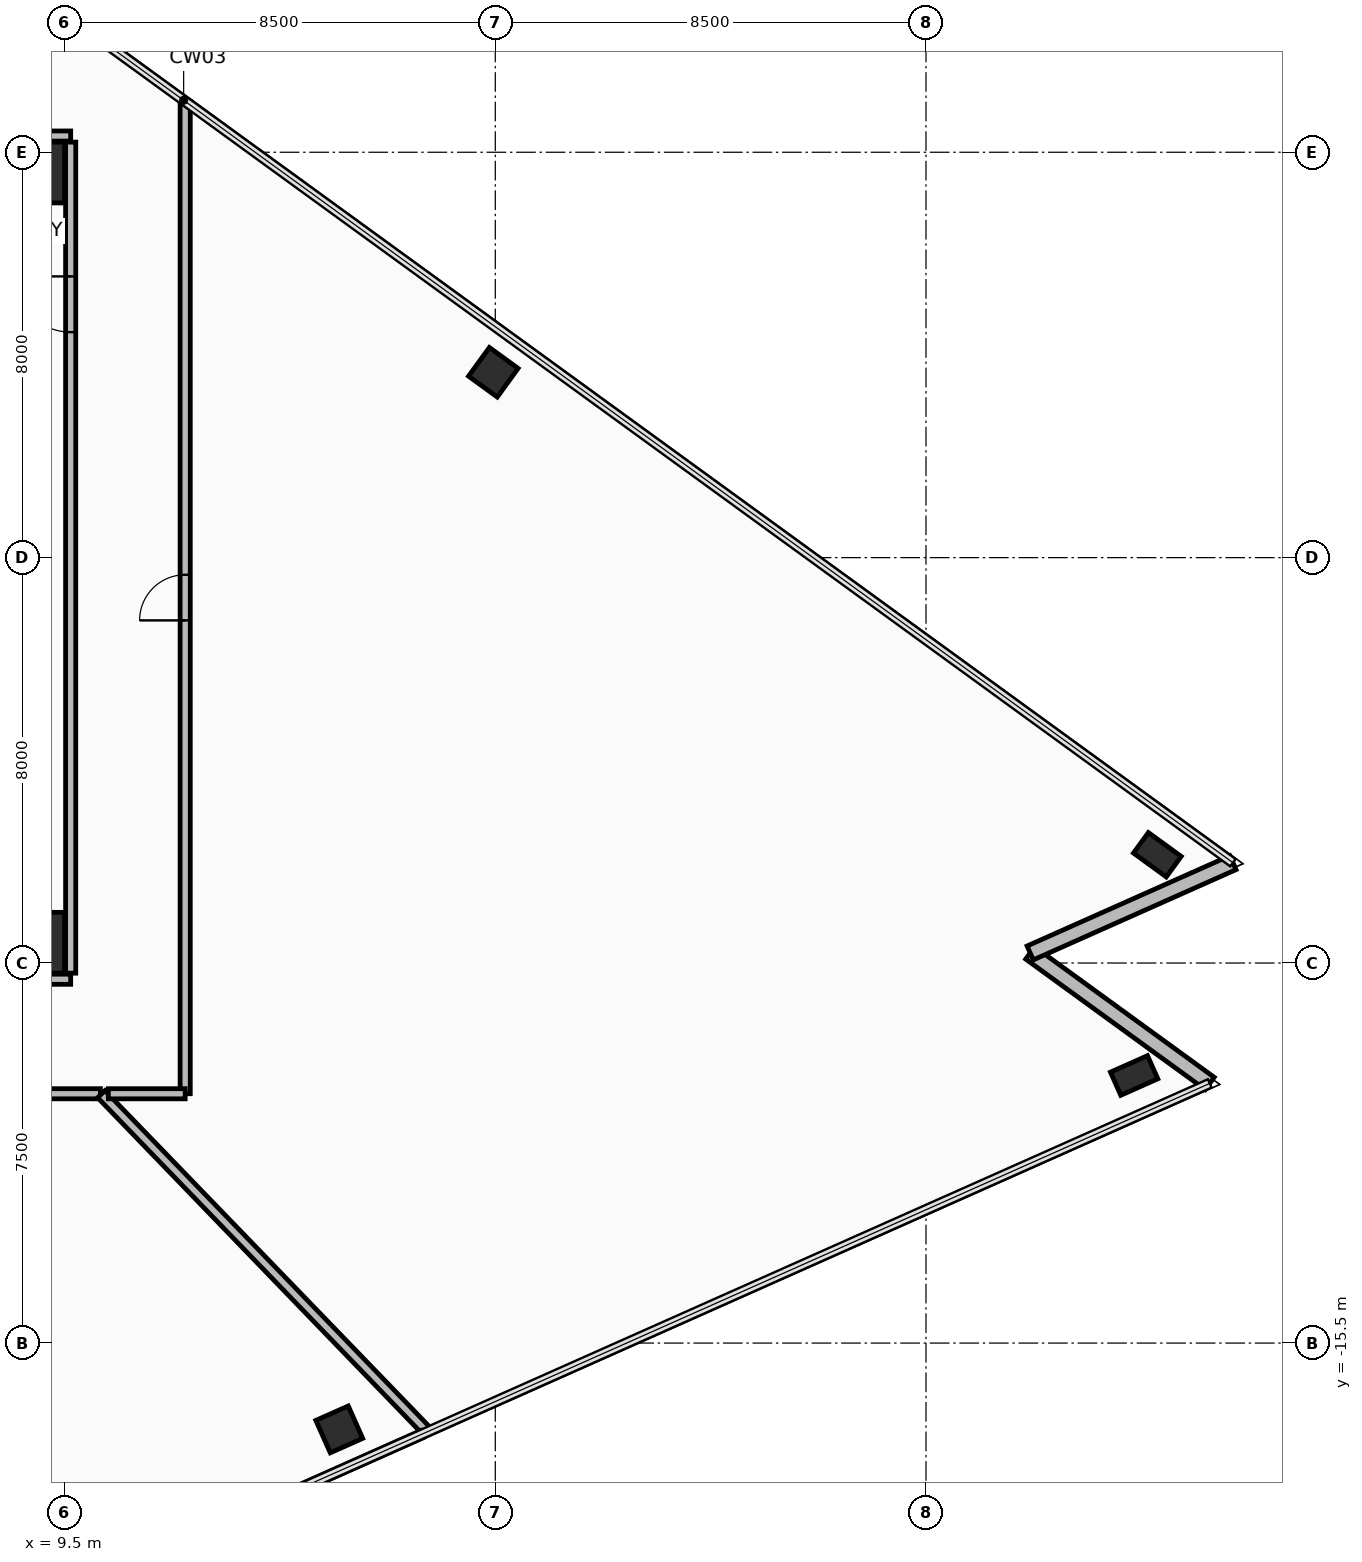
"""IFC4 building model, lengths in metres.
Left out: names, types, materials, properties, quantities, classifications, styles, units other than length and angle.
Written with IfcOpenShell. Run it as: python <this file> out.ifc"""

import sys

from ifc_helpers import new_model, si_unit, direction, frame, frame_2d, origin, origin_2d, place, context, subcontext, project, spatial, rectangle, hollow_rectangle, extrude, element, fill, save


model = new_model("IFC4")
c1 = context("Model", 3, precision=1e-05, world=origin(), true_north=direction((0.0, 1.0)))
c2 = subcontext(c1, "Body", "Model", "MODEL_VIEW")
j1 = project(units=[si_unit("LENGTHUNIT", "METRE"), si_unit("PLANEANGLEUNIT", "RADIAN")], contexts=[c1])
p1 = place(None, origin())
s1 = spatial("IfcSite", under=j1, at=p1, CompositionType="ELEMENT")
p2 = place(p1, origin())
s2 = spatial("IfcBuilding", under=s1, at=p2, CompositionType="ELEMENT")
p3 = place(p2, frame((0.0, 0.0, 123.25)))
s3 = spatial("IfcBuildingStorey", under=s2, at=p3, CompositionType="ELEMENT", Elevation=123.25)
for number, where, z_axis, x_axis in (
    (1, (8.9, -7.6, 0.0), (0.0, 0.0, 1.0), (1.0, 0.0, 0.0)),
    (2, (8.9, 7.6, 0.0), (0.0, 0.0, 1.0), (1.0, 0.0, 0.0)),
):
    element("IfcColumn", number, at=place(p3, frame(where, z_axis=z_axis, x_axis=x_axis)), inside=s3, PredefinedType="COLUMN", context=c2, shape_type="SweptSolid", body=[
        extrude(rectangle(XDim=1.2, YDim=1.2, at=origin_2d()), origin(), (0.0, 0.0, 1.0), 3.6),
    ])
p4 = place(p3, frame((14.921, -17.204, 0.0), z_axis=(0.0, 0.0, 1.0), x_axis=(0.913545457643, 0.406736643076, 0.0)))
e3 = element("IfcColumn", 3, at=p4, inside=s3, PredefinedType="COLUMN", context=c2, shape_type="SweptSolid", body=[
    extrude(hollow_rectangle(XDim=0.7, YDim=0.7, WallThickness=0.04, at=origin_2d()), origin(), (0.0, 0.0, 1.0), 3.6),
])
for number, where, z_axis, x_axis in (
    (4, (30.608, -10.219, 0.0), (0.0, 0.0, 1.0), (0.914, 0.407, 0.0)),
    (5, (31.066, -5.863, 0.0), (0.0, 0.0, 1.0), (-0.809, 0.588, 0.0)),
):
    element("IfcColumn", number, at=place(p3, frame(where, z_axis=z_axis, x_axis=x_axis)), inside=s3, PredefinedType="COLUMN", context=c2, shape_type="SweptSolid", body=[
        extrude(hollow_rectangle(XDim=0.5, YDim=0.8, WallThickness=0.04, at=origin_2d()), origin(), (0.0, 0.0, 1.0), 3.6),
    ])
p5 = place(p3, frame((17.961, 3.658, 0.0), z_axis=(0.0, 0.0, 1.0), x_axis=(-0.809016994375, 0.587785252292, 0.0)))
e6 = element("IfcColumn", 6, at=p5, inside=s3, PredefinedType="COLUMN", context=c2, shape_type="SweptSolid", body=[
    extrude(hollow_rectangle(XDim=0.7, YDim=0.7, WallThickness=0.04, at=origin_2d()), origin(), (0.0, 0.0, 1.0), 3.6),
])
for number, where, z_axis, x_axis in (
    (7, (32.1, -10.376, 0.0), (0.0, 0.0, 1.0), (-0.809, 0.588, 0.0)),
    (8, (28.556, -7.802, 0.0), (0.0, 0.0, 1.0), (0.914, 0.407, 0.0)),
):
    element("IfcWall", number, at=place(p3, frame(where, z_axis=z_axis, x_axis=x_axis)), inside=s3, PredefinedType="STANDARD", context=c2, shape_type="SweptSolid", body=[
        extrude(rectangle(XDim=4.38, YDim=0.3, at=frame_2d((2.19, 0.0))), origin(), (0.0, 0.0, 1.0), 2.705),
    ])
p6 = place(p3, frame((-9.62, -8.32, 0.0), z_axis=(0.0, 0.0, 1.0), x_axis=(1.0, 0.0, 0.0)))
e9 = element("IfcWall", 9, at=p6, inside=s3, PredefinedType="PARTITIONING", context=c2, shape_type="SweptSolid", body=[
    extrude(rectangle(XDim=19.24, YDim=0.2, at=frame_2d((9.62, 0.0))), origin(), (0.0, 0.0, 1.0), 2.855),
])
p7 = place(p6, frame((8.57, 0.0, 0.0)))
e10 = element("IfcOpeningElement", 10, at=p7, cuts=e9, PredefinedType="OPENING", context=c2, shape_type="SweptSolid", body=[
    extrude(rectangle(XDim=0.9, YDim=2.1, at=frame_2d((0.45, 1.05))), frame((0.0, 0.11, 0.0), z_axis=(0.0, -1.0, 0.0), x_axis=(1.0, 0.0, 0.0)), (0.0, 0.0, 1.0), 0.22),
])
p8 = place(p6, frame((15.02, 0.0, 0.0)))
e11 = element("IfcOpeningElement", 11, at=p8, cuts=e9, PredefinedType="OPENING", context=c2, shape_type="SweptSolid", body=[
    extrude(rectangle(XDim=0.9, YDim=2.1, at=frame_2d((0.45, 1.05))), frame((0.0, 0.11, 0.0), z_axis=(0.0, -1.0, 0.0), x_axis=(1.0, 0.0, 0.0)), (0.0, 0.0, 1.0), 0.22),
])
p9 = place(p3, frame((9.62, 8.32, 0.0), z_axis=(0.0, 0.0, 1.0), x_axis=(-1.0, 0.0, 0.0)))
e12 = element("IfcWall", 12, at=p9, inside=s3, PredefinedType="PARTITIONING", context=c2, shape_type="SweptSolid", body=[
    extrude(rectangle(XDim=19.24, YDim=0.2, at=frame_2d((9.62, 0.0))), origin(), (0.0, 0.0, 1.0), 2.755),
])
p10 = place(p9, frame((14.22, 0.0, 0.0)))
e13 = element("IfcOpeningElement", 13, at=p10, cuts=e12, PredefinedType="OPENING", context=c2, shape_type="SweptSolid", body=[
    extrude(rectangle(XDim=0.9, YDim=2.1, at=frame_2d((0.45, 1.05))), frame((0.0, 0.11, 0.0), z_axis=(0.0, -1.0, 0.0), x_axis=(1.0, 0.0, 0.0)), (0.0, 0.0, 1.0), 0.22),
])
p11 = place(p3, frame((9.62, -8.2, 0.0), z_axis=(0.0, 0.0, 1.0), x_axis=(0.0, 1.0, 0.0)))
e14 = element("IfcWall", 14, at=p11, inside=s3, PredefinedType="PARTITIONING", context=c2, shape_type="SweptSolid", body=[
    extrude(rectangle(XDim=16.4, YDim=0.2, at=frame_2d((8.2, 0.0))), origin(), (0.0, 0.0, 1.0), 2.855),
])
p12 = place(p11, frame((12.65, 0.0, 0.0)))
e15 = element("IfcOpeningElement", 15, at=p12, cuts=e14, PredefinedType="OPENING", context=c2, shape_type="SweptSolid", body=[
    extrude(rectangle(XDim=1.1, YDim=2.15, at=frame_2d((0.55, 1.075))), frame((0.0, 0.11, 0.0), z_axis=(0.0, -1.0, 0.0), x_axis=(1.0, 0.0, 0.0)), (0.0, 0.0, 1.0), 0.22),
])
p13 = place(p3, frame((-9.515, -10.58, 0.0), z_axis=(0.0, 0.0, 1.0), x_axis=(1.0, 0.0, 0.0)))
e16 = element("IfcWall", 16, at=p13, inside=s3, PredefinedType="PARTITIONING", context=c2, shape_type="SweptSolid", body=[
    extrude(rectangle(XDim=19.721, YDim=0.2, at=frame_2d((9.861, 0.0))), origin(), (0.0, 0.0, 1.0), 2.855),
])
p14 = place(p13, frame((9.436, 0.0, 0.0)))
e17 = element("IfcOpeningElement", 17, at=p14, cuts=e16, PredefinedType="OPENING", context=c2, shape_type="SweptSolid", body=[
    extrude(rectangle(XDim=0.85, YDim=2.1, at=frame_2d((0.425, 1.05))), frame((0.0, 0.11, 0.0), z_axis=(0.0, -1.0, 0.0), x_axis=(1.0, 0.0, 0.0)), (0.0, 0.0, 1.0), 0.22),
])
p15 = place(p3, frame((10.224, -10.588, 0.0), z_axis=(0.0, 0.0, 1.0), x_axis=(0.694650486702, -0.719347413511, 0.0)))
e18 = element("IfcWall", 18, at=p15, inside=s3, PredefinedType="PARTITIONING", context=c2, shape_type="SweptSolid", body=[
    extrude(rectangle(XDim=9.263, YDim=0.2, at=frame_2d((4.631, 0.0))), origin(), (0.0, 0.0, 1.0), 2.705),
])
p16 = place(p3, frame((16.557, -17.296, 0.0), z_axis=(0.0, 0.0, 1.0), x_axis=(-0.913544936997, -0.406737812464, 0.0)))
e19 = element("IfcWall", 19, at=p16, inside=s3, PredefinedType="PARTITIONING", context=c2, shape_type="SweptSolid", body=[
    extrude(rectangle(XDim=36.92, YDim=0.15, at=frame_2d((18.46, 0.0))), origin(), (0.0, 0.0, 1.0), 3.41),
])
p17 = place(p3, frame((11.88, -10.579, 0.0), z_axis=(0.0, 0.0, 1.0), x_axis=(0.0, 1.0, 0.0)))
e20 = element("IfcWall", 20, at=p17, inside=s3, PredefinedType="PARTITIONING", context=c2, shape_type="SweptSolid", body=[
    extrude(rectangle(XDim=19.583, YDim=0.2, at=frame_2d((9.792, 0.0))), origin(), (0.0, 0.0, 1.0), 2.705),
])
p18 = place(p17, frame((9.341, 0.0, 0.0)))
e21 = element("IfcOpeningElement", 21, at=p18, cuts=e20, PredefinedType="OPENING", context=c2, shape_type="SweptSolid", body=[
    extrude(rectangle(XDim=0.9, YDim=2.1, at=frame_2d((0.45, 1.05))), frame((0.0, 0.11, 0.0), z_axis=(0.0, -1.0, 0.0), x_axis=(1.0, 0.0, 0.0)), (0.0, 0.0, 1.0), 0.22),
])
p19 = place(p3, frame((10.363, -10.58, 0.0), z_axis=(0.0, 0.0, 1.0), x_axis=(1.0, 0.0, 0.0)))
e22 = element("IfcWall", 22, at=p19, inside=s3, PredefinedType="PARTITIONING", context=c2, shape_type="SweptSolid", body=[
    extrude(rectangle(XDim=1.516, YDim=0.2, at=frame_2d((0.758, 0.0))), origin(), (0.0, 0.0, 1.0), 2.855),
])
p20 = place(p12, frame((1.1, 0.0, 0.0), z_axis=(0.0, 0.0, 1.0), x_axis=(-1.0, 0.0, 0.0)))
e23 = element("IfcDoor", 23, at=p20, inside=s3, OperationType="SINGLE_SWING_LEFT", PredefinedType="DOOR", context=c2, shape_type="SweptSolid", body=[
    extrude(rectangle(XDim=1.1, YDim=2.15, at=frame_2d((0.55, 1.075))), frame((0.0, 0.025, 0.0), z_axis=(0.0, -1.0, 0.0), x_axis=(1.0, 0.0, 0.0)), (0.0, 0.0, 1.0), 0.05),
])
fill(e15, e23)
p21 = place(p18, origin())
e24 = element("IfcDoor", 24, at=p21, inside=s3, OperationType="SINGLE_SWING_LEFT", PredefinedType="DOOR", context=c2, shape_type="SweptSolid", body=[
    extrude(rectangle(XDim=0.9, YDim=2.1, at=frame_2d((0.45, 1.05))), frame((0.0, 0.025, 0.0), z_axis=(0.0, -1.0, 0.0), x_axis=(1.0, 0.0, 0.0)), (0.0, 0.0, 1.0), 0.05),
])
fill(e21, e24)
save(model, sys.argv[1])
